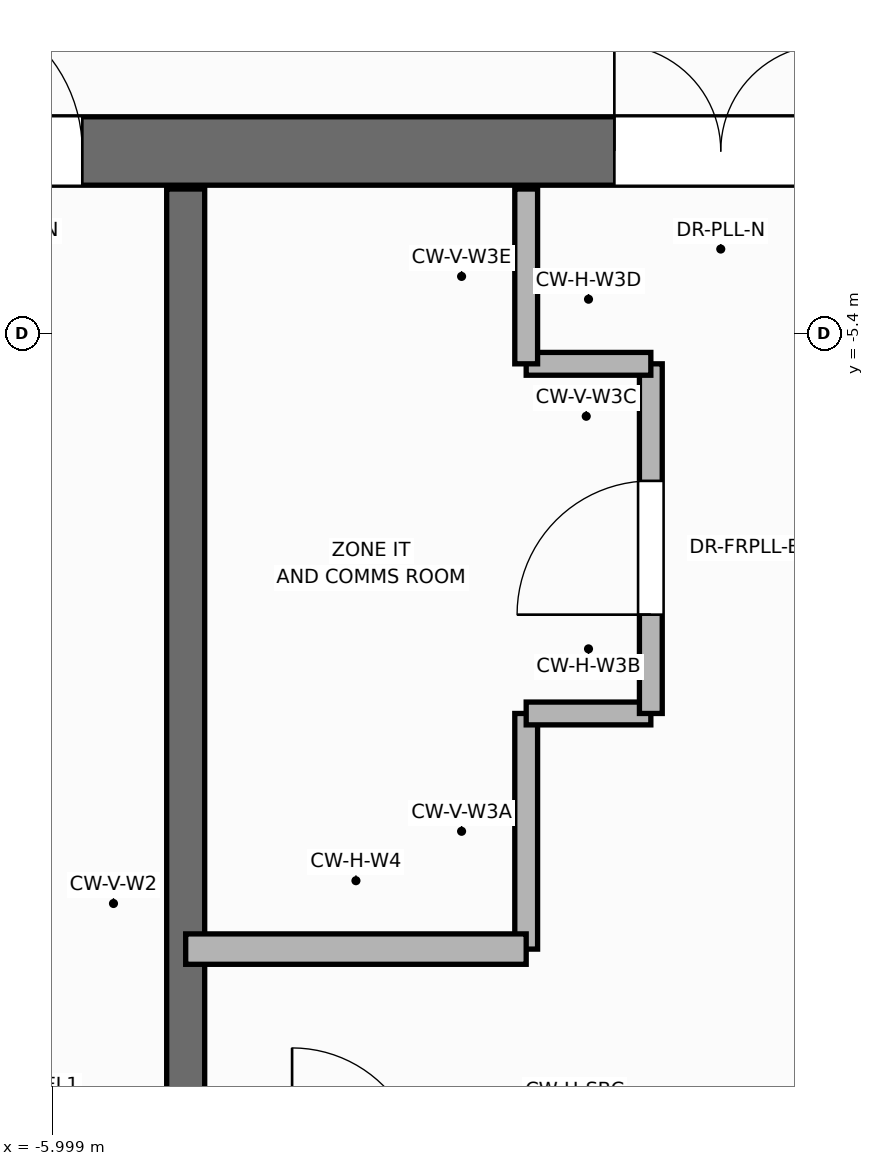
"""IFC4 building model, lengths in metres.
Left out: names, types, materials, properties, quantities, classifications, styles, units other than length and angle.
Written with IfcOpenShell. Run it as: python <this file> out.ifc"""

import sys

from ifc_helpers import new_model, si_unit, direction, frame, frame_2d, origin, place, context, subcontext, project, spatial, rectangle, extrude, element, fill, save


model = new_model("IFC4")
c1 = context("Model", 3, precision=1e-05, world=origin(), true_north=direction((0.0, 1.0)))
c2 = subcontext(c1, "Body", "Model", "MODEL_VIEW")
j1 = project(units=[si_unit("LENGTHUNIT", "METRE"), si_unit("PLANEANGLEUNIT", "RADIAN")], contexts=[c1])
p1 = place(None, origin())
s1 = spatial("IfcSite", under=j1, at=p1, CompositionType="ELEMENT")
p2 = place(p1, origin())
s2 = spatial("IfcBuilding", under=s1, at=p2, CompositionType="ELEMENT")
p3 = place(p2, frame((0.0, 0.0, 301.8)))
s3 = spatial("IfcBuildingStorey", under=s2, at=p3, CompositionType="ELEMENT", Elevation=301.8)
p4 = place(p3, frame((-2.88, -9.45, 0.0), z_axis=(0.0, 0.0, 1.0), x_axis=(0.0, 1.0, 0.0)))
e1 = element("IfcWall", 1, at=p4, inside=s3, PredefinedType="PARTITIONING", context=c2, shape_type="SweptSolid", body=[
    extrude(rectangle(XDim=1.55, YDim=0.15, at=frame_2d((0.775, 0.0))), origin(), (0.0, 0.0, 1.0), 3.88),
])
p5 = place(p3, frame((-2.88, -7.9, 0.0), z_axis=(0.0, 0.0, 1.0), x_axis=(1.0, 0.0, 0.0)))
e2 = element("IfcWall", 2, at=p5, inside=s3, PredefinedType="PARTITIONING", context=c2, shape_type="SweptSolid", body=[
    extrude(rectangle(XDim=0.82, YDim=0.15, at=frame_2d((0.41, 0.0))), origin(), (0.0, 0.0, 1.0), 3.88),
])
p6 = place(p3, frame((-2.06, -7.9, 0.0), z_axis=(0.0, 0.0, 1.0), x_axis=(0.0, 1.0, 0.0)))
e3 = element("IfcWall", 3, at=p6, inside=s3, PredefinedType="PARTITIONING", context=c2, shape_type="SweptSolid", body=[
    extrude(rectangle(XDim=2.3, YDim=0.15, at=frame_2d((1.15, 0.0))), origin(), (0.0, 0.0, 1.0), 3.88),
])
p7 = place(p6, frame((0.65, 0.0, 0.0)))
e4 = element("IfcOpeningElement", 4, at=p7, cuts=e3, PredefinedType="OPENING", context=c2, shape_type="SweptSolid", body=[
    extrude(rectangle(XDim=0.886, YDim=2.104, at=frame_2d((0.44, 1.052))), frame((0.0, 0.085, 0.0), z_axis=(0.0, -1.0, 0.0), x_axis=(1.0, 0.0, 0.0)), (0.0, 0.0, 1.0), 0.17),
])
p8 = place(p3, frame((-2.88, -5.6, 0.0), z_axis=(0.0, 0.0, 1.0), x_axis=(1.0, 0.0, 0.0)))
e5 = element("IfcWall", 5, at=p8, inside=s3, PredefinedType="PARTITIONING", context=c2, shape_type="SweptSolid", body=[
    extrude(rectangle(XDim=0.82, YDim=0.15, at=frame_2d((0.41, 0.0))), origin(), (0.0, 0.0, 1.0), 3.88),
])
p9 = place(p3, frame((-2.88, -5.6, 0.0), z_axis=(0.0, 0.0, 1.0), x_axis=(0.0, 1.0, 0.0)))
e6 = element("IfcWall", 6, at=p9, inside=s3, PredefinedType="PARTITIONING", context=c2, shape_type="SweptSolid", body=[
    extrude(rectangle(XDim=1.15, YDim=0.15, at=frame_2d((0.575, 0.0))), origin(), (0.0, 0.0, 1.0), 3.88),
])
p10 = place(p3, frame((-12.65, -4.2, 0.0), z_axis=(0.0, 0.0, 1.0), x_axis=(1.0, 0.0, 0.0)))
e7 = element("IfcWall", 7, at=p10, inside=s3, PredefinedType="SHEAR", context=c2, shape_type="SweptSolid", body=[
    extrude(rectangle(XDim=25.3, YDim=0.45, at=frame_2d((12.65, 0.0))), origin(), (0.0, 0.0, 1.0), 4.2),
])
p11 = place(p10, frame((1.85, 0.0, 0.0)))
e8 = element("IfcOpeningElement", 8, at=p11, cuts=e7, PredefinedType="OPENING", context=c2, shape_type="SweptSolid", body=[
    extrude(rectangle(XDim=0.756, YDim=2.054, at=frame_2d((0.375, 1.027))), frame((0.0, 0.235, 0.0), z_axis=(0.0, -1.0, 0.0), x_axis=(1.0, 0.0, 0.0)), (0.0, 0.0, 1.0), 0.47),
])
p12 = place(p10, frame((21.85, 0.0, 0.0)))
e9 = element("IfcOpeningElement", 9, at=p12, cuts=e7, PredefinedType="OPENING", context=c2, shape_type="SweptSolid", body=[
    extrude(rectangle(XDim=0.756, YDim=2.054, at=frame_2d((0.375, 1.027))), frame((0.0, 0.235, 0.0), z_axis=(0.0, -1.0, 0.0), x_axis=(1.0, 0.0, 0.0)), (0.0, 0.0, 1.0), 0.47),
])
p13 = place(p10, frame((23.5, 0.0, 0.0)))
e10 = element("IfcOpeningElement", 10, at=p13, cuts=e7, PredefinedType="OPENING", context=c2, shape_type="SweptSolid", body=[
    extrude(rectangle(XDim=0.756, YDim=2.054, at=frame_2d((0.375, 1.027))), frame((0.0, 0.235, 0.0), z_axis=(0.0, -1.0, 0.0), x_axis=(1.0, 0.0, 0.0)), (0.0, 0.0, 1.0), 0.47),
])
p14 = place(p10, frame((5.85, 0.0, 0.0)))
e11 = element("IfcOpeningElement", 11, at=p14, cuts=e7, PredefinedType="OPENING", context=c2, shape_type="SweptSolid", body=[
    extrude(rectangle(XDim=1.006, YDim=2.104, at=frame_2d((0.5, 1.052))), frame((0.0, 0.235, 0.0), z_axis=(0.0, -1.0, 0.0), x_axis=(1.0, 0.0, 0.0)), (0.0, 0.0, 1.0), 0.47),
])
p15 = place(p10, frame((10.35, 0.0, 0.0)))
e12 = element("IfcOpeningElement", 12, at=p15, cuts=e7, PredefinedType="OPENING", context=c2, shape_type="SweptSolid", body=[
    extrude(rectangle(XDim=1.406, YDim=2.154, at=frame_2d((0.7, 1.077))), frame((0.0, 0.235, 0.0), z_axis=(0.0, -1.0, 0.0), x_axis=(1.0, 0.0, 0.0)), (0.0, 0.0, 1.0), 0.47),
])
p16 = place(p10, frame((18.45, 0.0, 0.0)))
e13 = element("IfcOpeningElement", 13, at=p16, cuts=e7, PredefinedType="OPENING", context=c2, shape_type="SweptSolid", body=[
    extrude(rectangle(XDim=1.006, YDim=2.104, at=frame_2d((0.5, 1.052))), frame((0.0, 0.235, 0.0), z_axis=(0.0, -1.0, 0.0), x_axis=(1.0, 0.0, 0.0)), (0.0, 0.0, 1.0), 0.47),
])
p17 = place(p3, frame((-5.12, -13.85, 0.0), z_axis=(0.0, 0.0, 1.0), x_axis=(0.0, 1.0, 0.0)))
e14 = element("IfcWall", 14, at=p17, inside=s3, PredefinedType="SHEAR", context=c2, shape_type="SweptSolid", body=[
    extrude(rectangle(XDim=9.4, YDim=0.25, at=frame_2d((4.7, 0.0))), origin(), (0.0, 0.0, 1.0), 4.2),
])
p18 = place(p3, frame((-5.12, -9.45, 0.0), z_axis=(0.0, 0.0, 1.0), x_axis=(1.0, 0.0, 0.0)))
e15 = element("IfcWall", 15, at=p18, inside=s3, PredefinedType="SOLIDWALL", context=c2, shape_type="SweptSolid", body=[
    extrude(rectangle(XDim=2.24, YDim=0.2, at=frame_2d((1.12, 0.0))), origin(), (0.0, 0.0, 1.0), 3.88),
])
p19 = place(p7, origin())
e16 = element("IfcDoor", 16, at=p19, inside=s3, OperationType="SINGLE_SWING_LEFT", PredefinedType="DOOR", context=c2, shape_type="SweptSolid", body=[
    extrude(rectangle(XDim=0.88, YDim=2.1, at=frame_2d((0.44, 1.05))), frame((0.0, 0.025, 0.0), z_axis=(0.0, -1.0, 0.0), x_axis=(1.0, 0.0, 0.0)), (0.0, 0.0, 1.0), 0.05),
])
fill(e4, e16)
p20 = place(p14, origin())
e17 = element("IfcDoor", 17, at=p20, inside=s3, OperationType="SINGLE_SWING_LEFT", PredefinedType="DOOR", context=c2, shape_type="SweptSolid", body=[
    extrude(rectangle(XDim=1.0, YDim=2.1, at=frame_2d((0.5, 1.05))), frame((0.0, 0.025, 0.0), z_axis=(0.0, -1.0, 0.0), x_axis=(1.0, 0.0, 0.0)), (0.0, 0.0, 1.0), 0.05),
])
fill(e11, e17)
p21 = place(p15, origin())
e18 = element("IfcDoor", 18, at=p21, inside=s3, OperationType="DOUBLE_DOOR_SINGLE_SWING", PredefinedType="DOOR", context=c2, shape_type="SweptSolid", body=[
    extrude(rectangle(XDim=1.4, YDim=2.15, at=frame_2d((0.7, 1.075))), frame((0.0, 0.025, 0.0), z_axis=(0.0, -1.0, 0.0), x_axis=(1.0, 0.0, 0.0)), (0.0, 0.0, 1.0), 0.05),
])
fill(e12, e18)
save(model, sys.argv[1])
